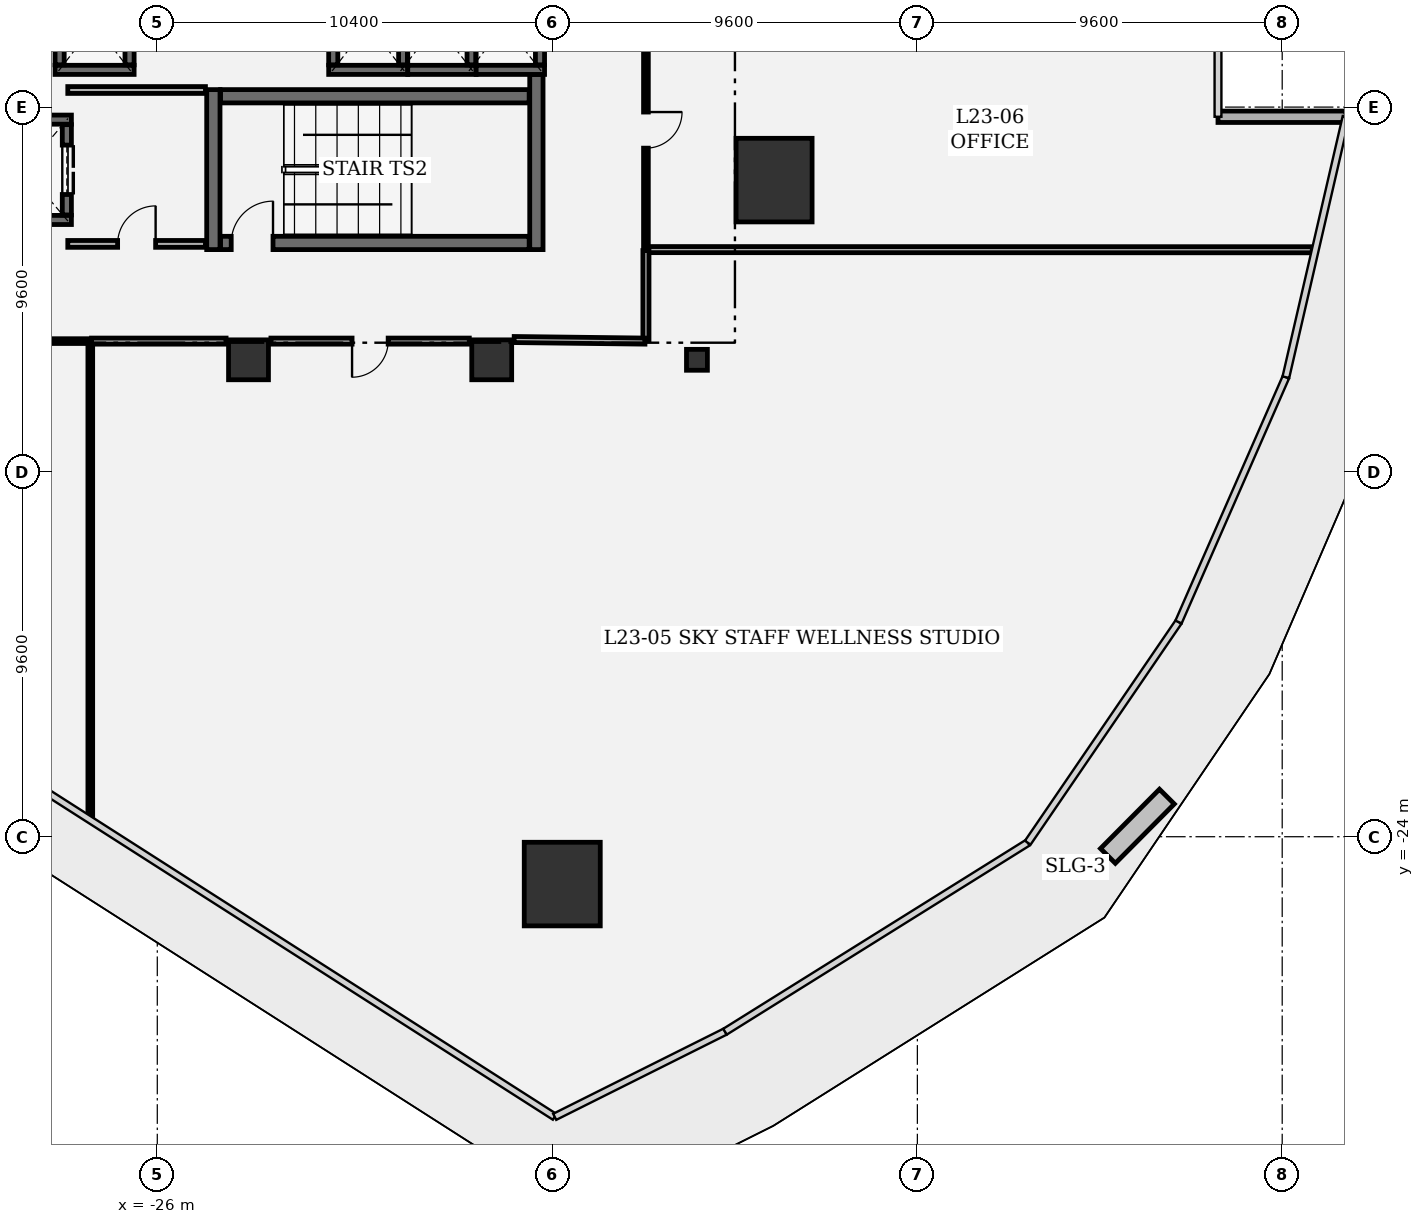
"""IFC4 building model, lengths in metres.
Left out: names, types, materials, properties, quantities, classifications, styles, units other than length and angle.
Written with IfcOpenShell. Run it as: python <this file> out.ifc"""

import sys

from ifc_helpers import new_model, si_unit, direction, frame, frame_2d, origin, origin_2d, place, context, subcontext, project, spatial, rectangle, extrude, element, fill, save


model = new_model("IFC4")
c1 = context("Model", 3, precision=1e-05, world=origin(), true_north=direction((0.0, 1.0)))
c2 = subcontext(c1, "Body", "Model", "MODEL_VIEW")
j1 = project(units=[si_unit("LENGTHUNIT", "METRE"), si_unit("PLANEANGLEUNIT", "RADIAN")], contexts=[c1])
p1 = place(None, origin())
s1 = spatial("IfcSite", under=j1, at=p1, CompositionType="ELEMENT")
p2 = place(p1, origin())
s2 = spatial("IfcBuilding", under=s1, at=p2, CompositionType="ELEMENT")
p3 = place(p2, frame((0.0, 0.0, 105.0)))
s3 = spatial("IfcBuildingStorey", under=s2, at=p3, CompositionType="ELEMENT", Elevation=105.0)
for number, where, z_axis, x_axis in (
    (1, (-15.344, -25.246, 0.0), (0.0, 0.0, 1.0), (1.0, 0.0, 0.0)),
    (2, (-9.77, -6.721, 0.0), (0.0, 0.0, 1.0), (1.0, 0.0, 0.0)),
):
    element("IfcColumn", number, at=place(p3, frame(where, z_axis=z_axis, x_axis=x_axis)), inside=s3, PredefinedType="COLUMN", context=c2, shape_type="SweptSolid", body=[
        extrude(rectangle(XDim=2.0, YDim=2.2, at=origin_2d()), origin(), (0.0, 0.0, 1.0), 4.8),
    ])
for number, where, z_axis, x_axis in (
    (3, (-17.2, -11.45, 0.0), (0.0, 0.0, 1.0), (1.0, 0.0, 0.0)),
    (4, (-23.6, -11.45, 0.0), (0.0, 0.0, 1.0), (1.0, 0.0, 0.0)),
):
    element("IfcColumn", number, at=place(p3, frame(where, z_axis=z_axis, x_axis=x_axis)), inside=s3, PredefinedType="COLUMN", context=c2, shape_type="SweptSolid", body=[
        extrude(rectangle(XDim=1.05, YDim=1.05, at=origin_2d()), origin(), (0.0, 0.0, 1.0), 4.8),
    ])
p4 = place(p3, frame((-11.8, -11.45, 0.0), z_axis=(0.0, 0.0, 1.0), x_axis=(1.0, 0.0, 0.0)))
e5 = element("IfcColumn", 5, at=p4, inside=s3, PredefinedType="COLUMN", context=c2, shape_type="SweptSolid", body=[
    extrude(rectangle(XDim=0.55, YDim=0.55, at=origin_2d()), origin(), (0.0, 0.0, 1.0), 4.8),
])
p5 = place(p3, frame((5.28, -5.054, 0.0), z_axis=(0.0, 0.0, 1.0), x_axis=(-1.0, 0.0, 0.0)))
e6 = element("IfcWall", 6, at=p5, inside=s3, PredefinedType="SOLIDWALL", context=c2, shape_type="SweptSolid", body=[
    extrude(rectangle(XDim=3.37, YDim=0.3, at=frame_2d((1.685, 0.0))), origin(), (0.0, 0.0, 1.0), 4.52),
])
p6 = place(p3, frame((-24.525, -4.34, 0.0), z_axis=(0.0, 0.0, 1.0), x_axis=(0.0, -1.0, 0.0)))
e7 = element("IfcWall", 7, at=p6, inside=s3, PredefinedType="SHEAR", context=c2, shape_type="SweptSolid", body=[
    extrude(rectangle(XDim=4.21, YDim=0.35, at=frame_2d((2.105, 0.0))), origin(), (0.0, 0.0, 1.0), 4.52),
])
p7 = place(p3, frame((-16.025, -8.55, 0.0), z_axis=(0.0, 0.0, 1.0), x_axis=(0.0, 1.0, 0.0)))
e8 = element("IfcWall", 8, at=p7, inside=s3, PredefinedType="SHEAR", context=c2, shape_type="SweptSolid", body=[
    extrude(rectangle(XDim=4.61, YDim=0.35, at=frame_2d((2.305, 0.0))), origin(), (0.0, 0.0, 1.0), 4.52),
])
p8 = place(p3, frame((-24.335, -8.375, 0.0), z_axis=(0.0, 0.0, 1.0), x_axis=(1.0, 0.0, 0.0)))
e9 = element("IfcWall", 9, at=p8, inside=s3, PredefinedType="SHEAR", context=c2, shape_type="SweptSolid", body=[
    extrude(rectangle(XDim=8.12, YDim=0.35, at=frame_2d((4.06, 0.0))), origin(), (0.0, 0.0, 1.0), 4.52),
])
p9 = place(p8, frame((0.28, 0.0, 0.0)))
e10 = element("IfcOpeningElement", 10, at=p9, cuts=e9, PredefinedType="OPENING", context=c2, shape_type="SweptSolid", body=[
    extrude(rectangle(XDim=1.1, YDim=2.2, at=frame_2d((0.55, 1.1))), frame((0.0, 0.185, 0.0), z_axis=(0.0, -1.0, 0.0), x_axis=(1.0, 0.0, 0.0)), (0.0, 0.0, 1.0), 0.37),
])
p10 = place(p3, frame((-16.215, -4.515, 0.0), z_axis=(0.0, 0.0, 1.0), x_axis=(-1.0, 0.0, 0.0)))
e11 = element("IfcWall", 11, at=p10, inside=s3, PredefinedType="SHEAR", context=c2, shape_type="SweptSolid", body=[
    extrude(rectangle(XDim=8.12, YDim=0.35, at=frame_2d((4.06, 0.0))), origin(), (0.0, 0.0, 1.0), 4.52),
])
for number, where, z_axis, x_axis in (
    (12, (-28.26, -7.77, 0.0), (0.0, 0.0, 1.0), (-1.0, 0.0, 0.0)),
    (13, (-30.74, -5.13, 0.0), (0.0, 0.0, 1.0), (1.0, 0.0, 0.0)),
):
    element("IfcWall", number, at=place(p3, frame(where, z_axis=z_axis, x_axis=x_axis)), inside=s3, PredefinedType="SHEAR", context=c2, shape_type="SweptSolid", body=[
        extrude(rectangle(XDim=2.48, YDim=0.24, at=frame_2d((1.24, 0.0))), origin(), (0.0, 0.0, 1.0), 4.52),
    ])
p11 = place(p3, frame((-28.38, -5.262, 0.0), z_axis=(0.0, 0.0, 1.0), x_axis=(0.0, -1.0, 0.0)))
e14 = element("IfcWall", 14, at=p11, inside=s3, PredefinedType="SHEAR", context=c2, shape_type="SweptSolid", body=[
    extrude(rectangle(XDim=2.376, YDim=0.24, at=frame_2d((1.188, 0.0))), origin(), (0.0, 0.0, 1.0), 4.52),
])
p12 = place(p11, frame((0.538, 0.0, 0.0)))
e15 = element("IfcOpeningElement", 15, at=p12, cuts=e14, PredefinedType="OPENING", context=c2, shape_type="SweptSolid", body=[
    extrude(rectangle(XDim=1.3, YDim=2.3, at=frame_2d((0.65, 1.15))), frame((0.0, 0.13, 0.0), z_axis=(0.0, -1.0, 0.0), x_axis=(1.0, 0.0, 0.0)), (0.0, 0.0, 1.0), 0.26),
])
p13 = place(p3, frame((-26.61, -3.82, 0.0), z_axis=(0.0, 0.0, 1.0), x_axis=(-1.0, 0.0, 0.0)))
e16 = element("IfcWall", 16, at=p13, inside=s3, PredefinedType="SHEAR", context=c2, shape_type="SweptSolid", body=[
    extrude(rectangle(XDim=2.08, YDim=0.24, at=frame_2d((1.04, 0.0))), origin(), (0.0, 0.0, 1.0), 4.52),
])
for number, where, z_axis, x_axis in (
    (17, (-28.57, -3.688, 0.0), (0.0, 0.0, 1.0), (0.0, 1.0, 0.0)),
    (18, (-26.73, -1.562, 0.0), (0.0, 0.0, 1.0), (0.0, -1.0, 0.0)),
):
    element("IfcWall", number, at=place(p3, frame(where, z_axis=z_axis, x_axis=x_axis)), inside=s3, PredefinedType="SHEAR", context=c2, shape_type="SweptSolid", body=[
        extrude(rectangle(XDim=2.126, YDim=0.24, at=frame_2d((1.063, 0.0))), origin(), (0.0, 0.0, 1.0), 4.52),
    ])
p14 = place(p3, frame((-19.41, -3.82, 0.0), z_axis=(0.0, 0.0, 1.0), x_axis=(-1.0, 0.0, 0.0)))
e19 = element("IfcWall", 19, at=p14, inside=s3, PredefinedType="SHEAR", context=c2, shape_type="SweptSolid", body=[
    extrude(rectangle(XDim=2.08, YDim=0.24, at=frame_2d((1.04, 0.0))), origin(), (0.0, 0.0, 1.0), 4.52),
])
for number, where, z_axis, x_axis in (
    (20, (-21.37, -3.688, 0.0), (0.0, 0.0, 1.0), (0.0, 1.0, 0.0)),
    (21, (-19.53, -1.562, 0.0), (0.0, 0.0, 1.0), (0.0, -1.0, 0.0)),
):
    element("IfcWall", number, at=place(p3, frame(where, z_axis=z_axis, x_axis=x_axis)), inside=s3, PredefinedType="SHEAR", context=c2, shape_type="SweptSolid", body=[
        extrude(rectangle(XDim=2.126, YDim=0.24, at=frame_2d((1.063, 0.0))), origin(), (0.0, 0.0, 1.0), 4.52),
    ])
p15 = place(p3, frame((-17.61, -3.82, 0.0), z_axis=(0.0, 0.0, 1.0), x_axis=(-1.0, 0.0, 0.0)))
e22 = element("IfcWall", 22, at=p15, inside=s3, PredefinedType="SHEAR", context=c2, shape_type="SweptSolid", body=[
    extrude(rectangle(XDim=1.8, YDim=0.24, at=frame_2d((0.9, 0.0))), origin(), (0.0, 0.0, 1.0), 4.52),
])
p16 = place(p3, frame((-17.73, -1.562, 0.0), z_axis=(0.0, 0.0, 1.0), x_axis=(0.0, -1.0, 0.0)))
e23 = element("IfcWall", 23, at=p16, inside=s3, PredefinedType="SHEAR", context=c2, shape_type="SweptSolid", body=[
    extrude(rectangle(XDim=2.126, YDim=0.24, at=frame_2d((1.063, 0.0))), origin(), (0.0, 0.0, 1.0), 4.52),
])
p17 = place(p3, frame((-15.81, -3.82, 0.0), z_axis=(0.0, 0.0, 1.0), x_axis=(-1.0, 0.0, 0.0)))
e24 = element("IfcWall", 24, at=p17, inside=s3, PredefinedType="SHEAR", context=c2, shape_type="SweptSolid", body=[
    extrude(rectangle(XDim=1.8, YDim=0.24, at=frame_2d((0.9, 0.0))), origin(), (0.0, 0.0, 1.0), 4.52),
])
p18 = place(p3, frame((-15.93, -1.562, 0.0), z_axis=(0.0, 0.0, 1.0), x_axis=(0.0, -1.0, 0.0)))
e25 = element("IfcWall", 25, at=p18, inside=s3, PredefinedType="SHEAR", context=c2, shape_type="SweptSolid", body=[
    extrude(rectangle(XDim=2.126, YDim=0.24, at=frame_2d((1.063, 0.0))), origin(), (0.0, 0.0, 1.0), 4.52),
])
p19 = place(p3, frame((-28.355, -8.4, 0.0), z_axis=(0.0, 0.0, 1.0), x_axis=(1.0, 0.0, 0.0)))
e26 = element("IfcWall", 26, at=p19, inside=s3, PredefinedType="PARTITIONING", context=c2, shape_type="SweptSolid", body=[
    extrude(rectangle(XDim=3.622, YDim=0.18, at=frame_2d((1.811, 0.0))), origin(), (0.0, 0.0, 1.0), 4.52),
])
p20 = place(p19, frame((1.311, 0.0, 0.0)))
e27 = element("IfcOpeningElement", 27, at=p20, cuts=e26, PredefinedType="OPENING", context=c2, shape_type="SweptSolid", body=[
    extrude(rectangle(XDim=1.0, YDim=2.15, at=frame_2d((0.5, 1.075))), frame((0.0, 0.1, 0.0), z_axis=(0.0, -1.0, 0.0), x_axis=(1.0, 0.0, 0.0)), (0.0, 0.0, 1.0), 0.2),
])
p21 = place(p3, frame((-24.733, -4.35, 0.0), z_axis=(0.0, 0.0, 1.0), x_axis=(-1.0, 0.0, 0.0)))
e28 = element("IfcWall", 28, at=p21, inside=s3, PredefinedType="PARTITIONING", context=c2, shape_type="SweptSolid", body=[
    extrude(rectangle(XDim=3.622, YDim=0.18, at=frame_2d((1.811, 0.0))), origin(), (0.0, 0.0, 1.0), 4.52),
])
p22 = place(p3, frame((-27.763, -23.481, 0.0), z_axis=(0.0, 0.0, 1.0), x_axis=(0.0, 1.0, 0.0)))
e29 = element("IfcWall", 29, at=p22, inside=s3, PredefinedType="PARTITIONING", context=c2, shape_type="SweptSolid", body=[
    extrude(rectangle(XDim=12.498, YDim=0.125, at=frame_2d((6.249, 0.0))), origin(), (0.0, 0.0, 1.0), 4.084),
])
p23 = place(p3, frame((-27.788, -10.958, 0.0), z_axis=(0.0, 0.0, 1.0), x_axis=(-1.0, 0.0, 0.0)))
e30 = element("IfcWall", 30, at=p23, inside=s3, PredefinedType="PARTITIONING", context=c2, shape_type="SweptSolid", body=[
    extrude(rectangle(XDim=10.796, YDim=0.125, at=frame_2d((5.398, 0.0))), origin(), (0.0, 0.0, 1.0), 4.084),
])
p24 = place(p23, frame((4.923, 0.0, 0.0)))
e31 = element("IfcOpeningElement", 31, at=p24, cuts=e30, PredefinedType="OPENING", context=c2, shape_type="SweptSolid", body=[
    extrude(rectangle(XDim=0.95, YDim=2.15, at=frame_2d((0.475, 1.075))), frame((0.0, 0.073, 0.0), z_axis=(0.0, -1.0, 0.0), x_axis=(1.0, 0.0, 0.0)), (0.0, 0.0, 1.0), 0.145),
])
p25 = place(p3, frame((-24.19, -10.958, 0.0), z_axis=(0.0, 0.0, 1.0), x_axis=(-1.0, 0.0, 0.0)))
e32 = element("IfcWall", 32, at=p25, inside=s3, PredefinedType="PARTITIONING", context=c2, shape_type="SweptSolid", body=[
    extrude(rectangle(XDim=3.54, YDim=0.16, at=frame_2d((1.77, 0.0))), origin(), (0.0, 0.0, 1.0), 4.52),
])
p26 = place(p3, frame((4.392, -8.554, 0.0), z_axis=(0.0, 0.0, 1.0), x_axis=(-0.999999968502, 0.000250990008, 0.0)))
e33 = element("IfcWall", 33, at=p26, inside=s3, PredefinedType="PARTITIONING", context=c2, shape_type="SweptSolid", body=[
    extrude(rectangle(XDim=17.509, YDim=0.16, at=frame_2d((8.754, 0.0))), origin(), (0.0, 0.0, 1.0), 3.635),
])
p27 = place(p3, frame((-13.142, -8.575, 0.0), z_axis=(0.0, 0.0, 1.0), x_axis=(0.0, -1.0, 0.0)))
e34 = element("IfcWall", 34, at=p27, inside=s3, PredefinedType="PARTITIONING", context=c2, shape_type="SweptSolid", body=[
    extrude(rectangle(XDim=2.358, YDim=0.16, at=frame_2d((1.179, 0.0))), origin(), (0.0, 0.0, 1.0), 4.52),
])
p28 = place(p3, frame((-13.167, -10.958, 0.0), z_axis=(0.0, 0.0, 1.0), x_axis=(-0.9999282084, 0.011982405674, 0.0)))
e35 = element("IfcWall", 35, at=p28, inside=s3, PredefinedType="PARTITIONING", context=c2, shape_type="SweptSolid", body=[
    extrude(rectangle(XDim=3.443, YDim=0.16, at=frame_2d((1.722, 0.0))), origin(), (0.0, 0.0, 1.0), 3.635),
])
p29 = place(p3, frame((-17.79, -10.958, 0.0), z_axis=(0.0, 0.0, 1.0), x_axis=(-1.0, 0.0, 0.0)))
e36 = element("IfcWall", 36, at=p29, inside=s3, PredefinedType="PARTITIONING", context=c2, shape_type="SweptSolid", body=[
    extrude(rectangle(XDim=5.22, YDim=0.16, at=frame_2d((2.61, 0.0))), origin(), (0.0, 0.0, 1.0), 4.52),
])
p30 = place(p29, frame((2.135, 0.0, 0.0)))
e37 = element("IfcOpeningElement", 37, at=p30, cuts=e36, PredefinedType="OPENING", context=c2, shape_type="SweptSolid", body=[
    extrude(rectangle(XDim=0.95, YDim=2.15, at=frame_2d((0.475, 1.075))), frame((0.0, 0.09, 0.0), z_axis=(0.0, -1.0, 0.0), x_axis=(1.0, 0.0, 0.0)), (0.0, 0.0, 1.0), 0.18),
])
p31 = place(p3, frame((-13.142, -2.294, 0.0), z_axis=(0.0, 0.0, 1.0), x_axis=(0.0, -1.0, 0.0)))
e38 = element("IfcWall", 38, at=p31, inside=s3, PredefinedType="PARTITIONING", context=c2, shape_type="SweptSolid", body=[
    extrude(rectangle(XDim=6.223, YDim=0.125, at=frame_2d((3.112, 0.0))), origin(), (0.0, 0.0, 1.0), 4.52),
])
p32 = place(p31, frame((2.637, 0.0, 0.0)))
e39 = element("IfcOpeningElement", 39, at=p32, cuts=e38, PredefinedType="OPENING", context=c2, shape_type="SweptSolid", body=[
    extrude(rectangle(XDim=0.95, YDim=2.15, at=frame_2d((0.475, 1.075))), frame((0.0, 0.073, 0.0), z_axis=(0.0, -1.0, 0.0), x_axis=(1.0, 0.0, 0.0)), (0.0, 0.0, 1.0), 0.145),
])
p33 = place(p9, origin())
e40 = element("IfcDoor", 40, at=p33, inside=s3, OperationType="SINGLE_SWING_RIGHT", PredefinedType="DOOR", context=c2, shape_type="SweptSolid", body=[
    extrude(rectangle(XDim=1.1, YDim=2.2, at=frame_2d((0.55, 1.1))), frame((0.0, 0.025, 0.0), z_axis=(0.0, -1.0, 0.0), x_axis=(1.0, 0.0, 0.0)), (0.0, 0.0, 1.0), 0.05),
])
fill(e10, e40)
p34 = place(p12, origin())
e41 = element("IfcDoor", 41, at=p34, inside=s3, OperationType="DOUBLE_DOOR_SLIDING", PredefinedType="DOOR", context=c2, shape_type="SweptSolid", body=[
    extrude(rectangle(XDim=1.3, YDim=2.3, at=frame_2d((0.65, 1.15))), frame((0.0, 0.025, 0.0), z_axis=(0.0, -1.0, 0.0), x_axis=(1.0, 0.0, 0.0)), (0.0, 0.0, 1.0), 0.05),
])
fill(e15, e41)
p35 = place(p30, origin())
e42 = element("IfcDoor", 42, at=p35, inside=s3, OperationType="SINGLE_SWING_RIGHT", PredefinedType="DOOR", context=c2, shape_type="SweptSolid", body=[
    extrude(rectangle(XDim=0.95, YDim=2.15, at=frame_2d((0.475, 1.075))), frame((0.0, 0.025, 0.0), z_axis=(0.0, -1.0, 0.0), x_axis=(1.0, 0.0, 0.0)), (0.0, 0.0, 1.0), 0.05),
])
fill(e37, e42)
p36 = place(p32, origin())
e43 = element("IfcDoor", 43, at=p36, inside=s3, OperationType="SINGLE_SWING_LEFT", PredefinedType="DOOR", context=c2, shape_type="SweptSolid", body=[
    extrude(rectangle(XDim=0.95, YDim=2.15, at=frame_2d((0.475, 1.075))), frame((0.0, 0.025, 0.0), z_axis=(0.0, -1.0, 0.0), x_axis=(1.0, 0.0, 0.0)), (0.0, 0.0, 1.0), 0.05),
])
fill(e39, e43)
p37 = place(p20, origin())
e44 = element("IfcDoor", 44, at=p37, inside=s3, OperationType="SINGLE_SWING_RIGHT", PredefinedType="DOOR", context=c2, shape_type="SweptSolid", body=[
    extrude(rectangle(XDim=1.0, YDim=2.15, at=frame_2d((0.5, 1.075))), frame((0.0, 0.025, 0.0), z_axis=(0.0, -1.0, 0.0), x_axis=(1.0, 0.0, 0.0)), (0.0, 0.0, 1.0), 0.05),
])
fill(e27, e44)
save(model, sys.argv[1])
